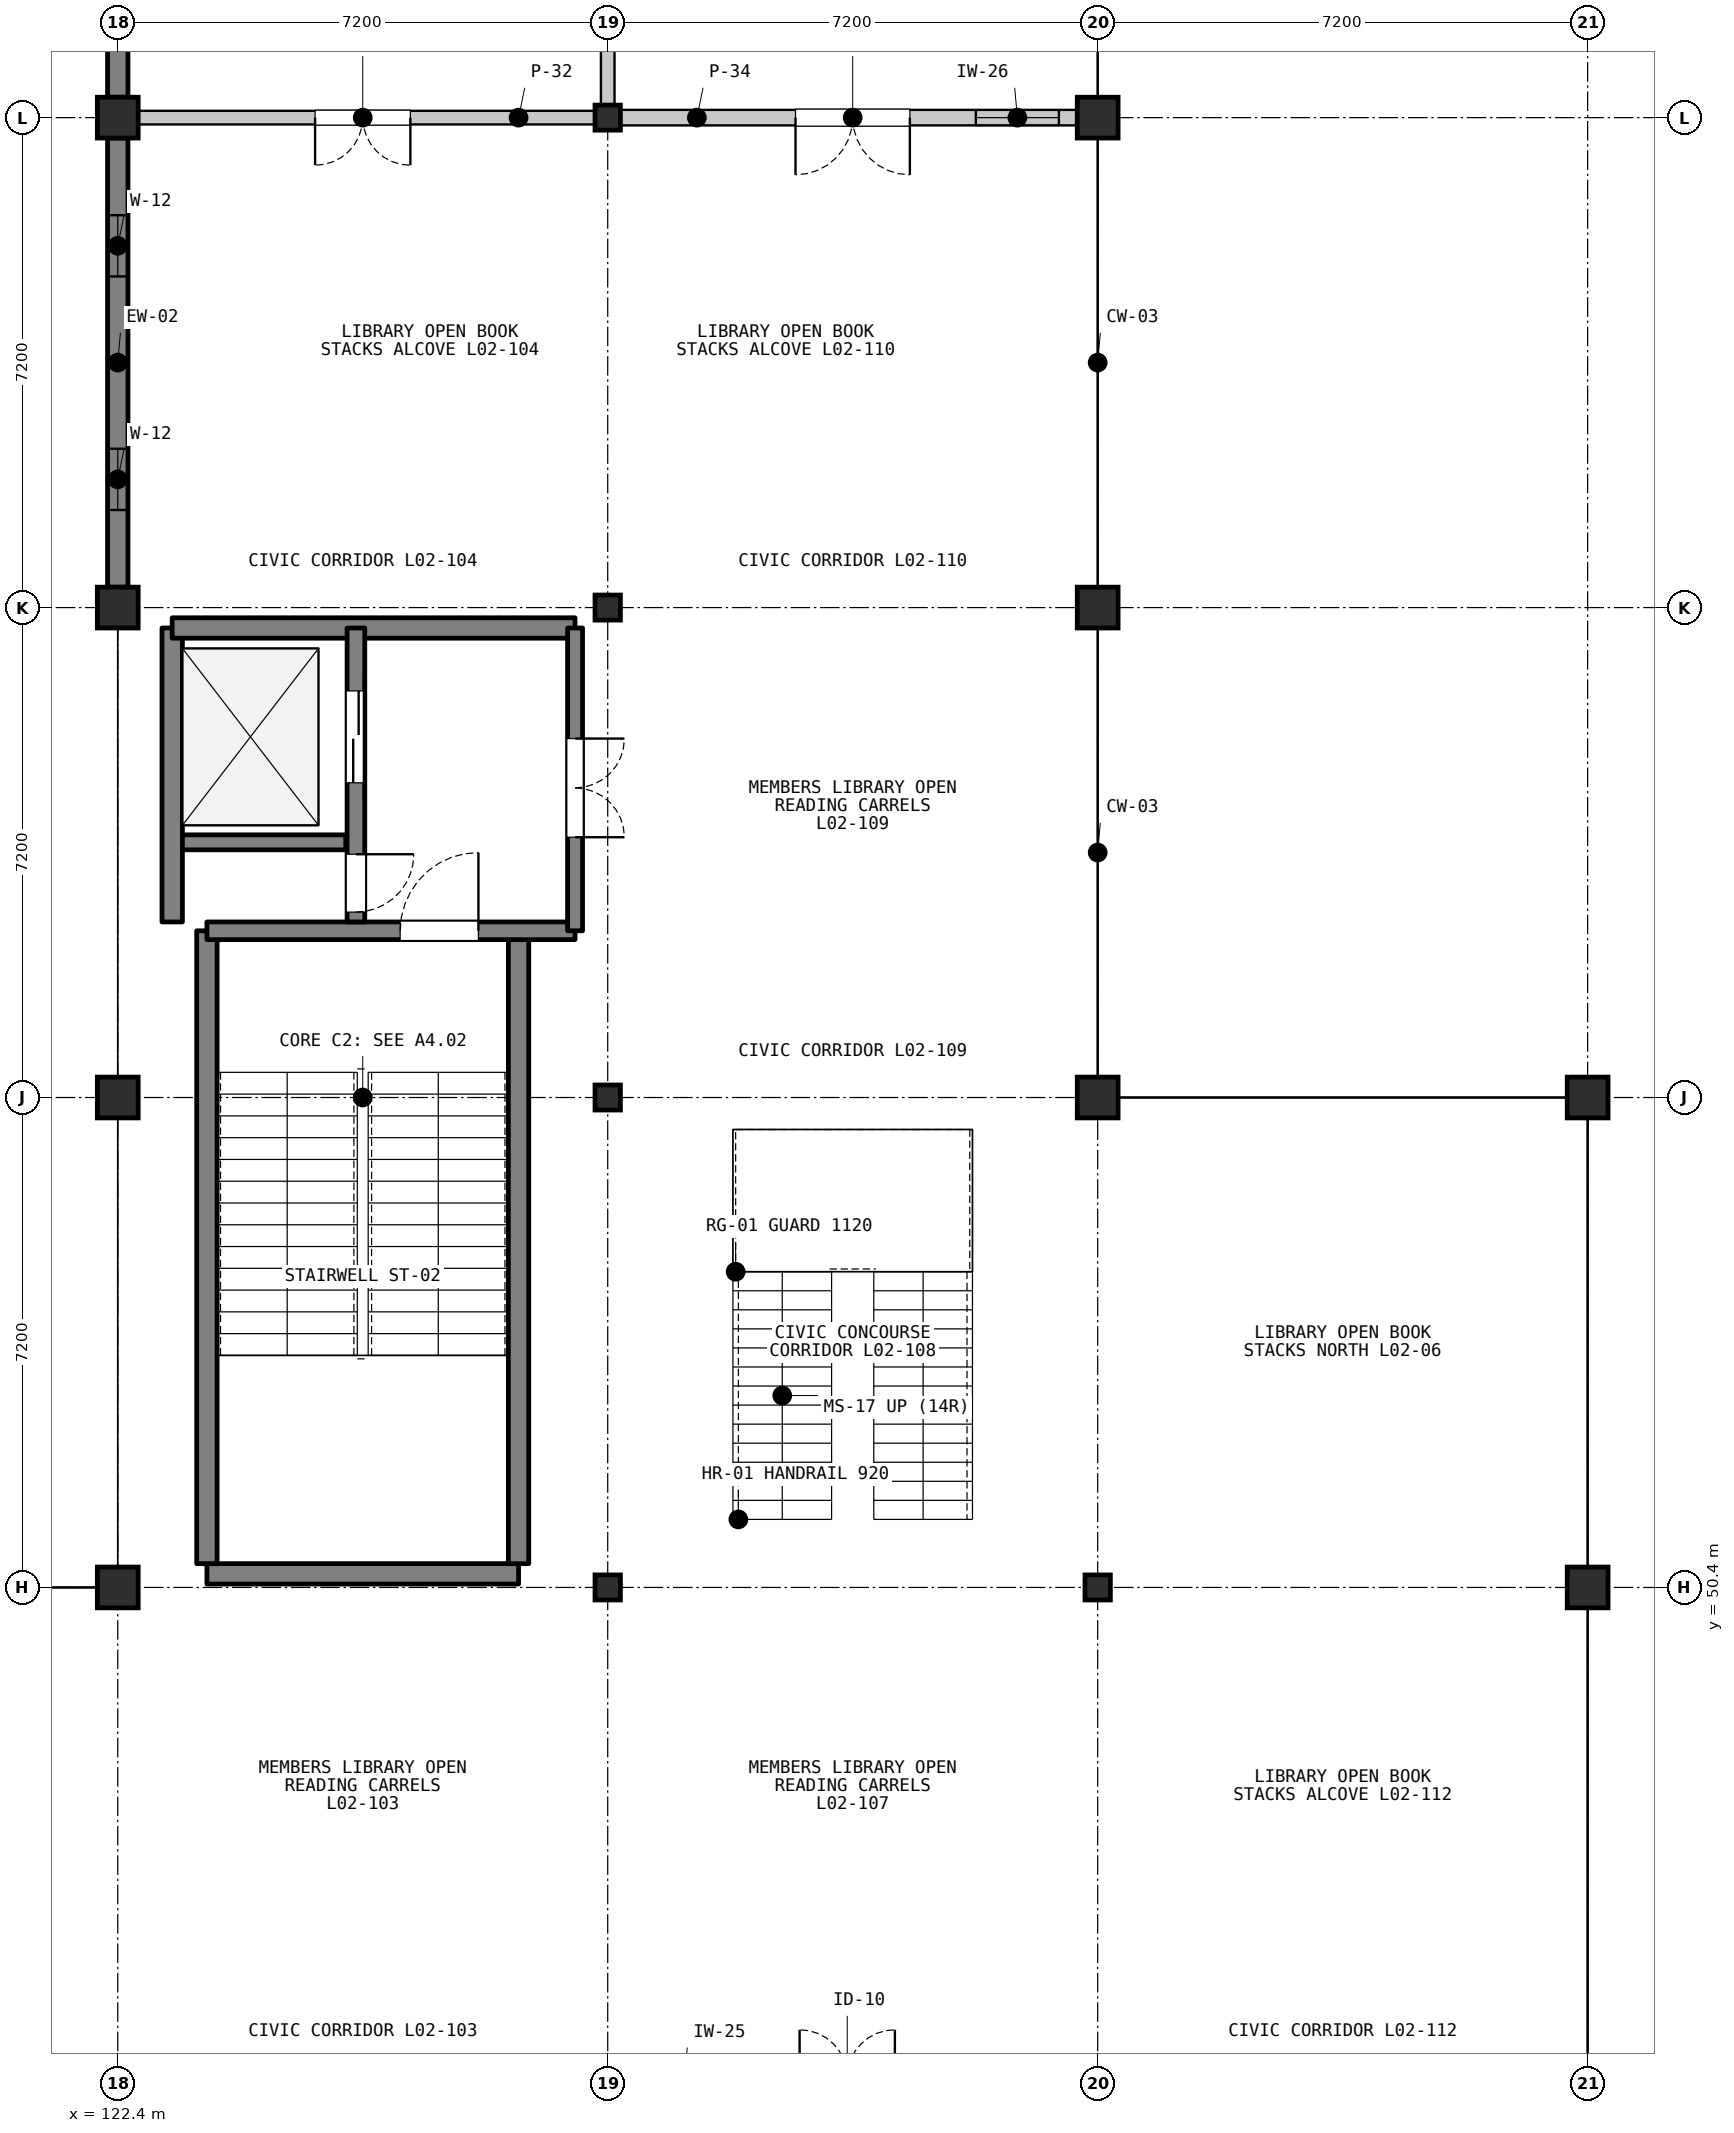
"""IFC4 building model, lengths in metres.
Left out: names, types, materials, properties, quantities, classifications, styles, units other than length and angle.
Written with IfcOpenShell. Run it as: python <this file> out.ifc"""

import sys

from ifc_helpers import new_model, si_unit, direction, frame, frame_2d, origin, origin_2d, place, context, subcontext, project, spatial, rectangle, i_section, extrude, element, fill, save


model = new_model("IFC4")
c1 = context("Model", 3, precision=1e-05, world=origin(), true_north=direction((0.0, 1.0)))
c2 = subcontext(c1, "Body", "Model", "MODEL_VIEW")
j1 = project(units=[si_unit("LENGTHUNIT", "METRE"), si_unit("PLANEANGLEUNIT", "RADIAN")], contexts=[c1])
p1 = place(None, origin())
s1 = spatial("IfcSite", under=j1, at=p1, CompositionType="ELEMENT")
p2 = place(p1, origin())
s2 = spatial("IfcBuilding", under=s1, at=p2, CompositionType="ELEMENT")
p3 = place(p2, frame((0.0, 0.0, 5.4)))
s3 = spatial("IfcBuildingStorey", under=s2, at=p3, CompositionType="ELEMENT", Elevation=5.4)
for number, where, z_axis, x_axis in (
    (1, (122.4, 50.4, 0.0), (0.0, 0.0, 1.0), (1.0, 0.0, 0.0)),
    (2, (122.4, 57.6, 0.0), (0.0, 0.0, 1.0), (1.0, 0.0, 0.0)),
    (3, (122.4, 64.8, 0.0), (0.0, 0.0, 1.0), (1.0, 0.0, 0.0)),
    (4, (122.4, 72.0, 0.0), (0.0, 0.0, 1.0), (1.0, 0.0, 0.0)),
):
    element("IfcColumn", number, at=place(p3, frame(where, z_axis=z_axis, x_axis=x_axis)), inside=s3, PredefinedType="COLUMN", context=c2, shape_type="SweptSolid", body=[
        extrude(rectangle(XDim=0.6, YDim=0.6, at=origin_2d()), origin(), (0.0, 0.0, 1.0), 4.5),
    ])
for number, where, z_axis, x_axis in (
    (5, (129.6, 50.4, 0.0), (0.0, 0.0, 1.0), (1.0, 0.0, 0.0)),
    (6, (129.6, 57.6, 0.0), (0.0, 0.0, 1.0), (1.0, 0.0, 0.0)),
    (7, (129.6, 64.8, 0.0), (0.0, 0.0, 1.0), (1.0, 0.0, 0.0)),
    (8, (129.6, 72.0, 0.0), (0.0, 0.0, 1.0), (1.0, 0.0, 0.0)),
    (9, (136.8, 50.4, 0.0), (0.0, 0.0, 1.0), (1.0, 0.0, 0.0)),
):
    element("IfcColumn", number, at=place(p3, frame(where, z_axis=z_axis, x_axis=x_axis)), inside=s3, PredefinedType="COLUMN", context=c2, shape_type="SweptSolid", body=[
        extrude(i_section(OverallWidth=0.373, OverallDepth=0.368, WebThickness=0.015, FlangeThickness=0.024, FilletRadius=0.015, at=origin_2d()), origin(), (0.0, 0.0, 1.0), 4.5),
    ])
for number, where, z_axis, x_axis in (
    (10, (136.8, 57.6, 0.0), (0.0, 0.0, 1.0), (1.0, 0.0, 0.0)),
    (11, (136.8, 64.8, 0.0), (0.0, 0.0, 1.0), (1.0, 0.0, 0.0)),
    (12, (136.8, 72.0, 0.0), (0.0, 0.0, 1.0), (1.0, 0.0, 0.0)),
    (13, (144.0, 50.4, 0.0), (0.0, 0.0, 1.0), (1.0, 0.0, 0.0)),
    (14, (144.0, 57.6, 0.0), (0.0, 0.0, 1.0), (1.0, 0.0, 0.0)),
):
    element("IfcColumn", number, at=place(p3, frame(where, z_axis=z_axis, x_axis=x_axis)), inside=s3, PredefinedType="COLUMN", context=c2, shape_type="SweptSolid", body=[
        extrude(rectangle(XDim=0.6, YDim=0.6, at=origin_2d()), origin(), (0.0, 0.0, 1.0), 4.5),
    ])
p4 = place(p3, frame((122.4, 65.1, 0.0), z_axis=(0.0, 0.0, 1.0), x_axis=(0.0, 1.0, 0.0)))
e15 = element("IfcWall", 15, at=p4, inside=s3, PredefinedType="SOLIDWALL", context=c2, shape_type="SweptSolid", body=[
    extrude(rectangle(XDim=6.6, YDim=0.3, at=frame_2d((3.3, 0.0))), origin(), (0.0, 0.0, 1.0), 3.767),
])
p5 = place(p4, frame((1.134, 0.0, 0.95)))
e16 = element("IfcOpeningElement", 16, at=p5, cuts=e15, PredefinedType="OPENING", context=c2, shape_type="SweptSolid", body=[
    extrude(rectangle(XDim=0.9, YDim=2.1, at=frame_2d((0.45, 1.05))), frame((0.0, 0.16, 0.0), z_axis=(0.0, -1.0, 0.0), x_axis=(1.0, 0.0, 0.0)), (0.0, 0.0, 1.0), 0.32),
])
p6 = place(p4, frame((4.566, 0.0, 0.95)))
e17 = element("IfcOpeningElement", 17, at=p6, cuts=e15, PredefinedType="OPENING", context=c2, shape_type="SweptSolid", body=[
    extrude(rectangle(XDim=0.9, YDim=2.1, at=frame_2d((0.45, 1.05))), frame((0.0, 0.16, 0.0), z_axis=(0.0, -1.0, 0.0), x_axis=(1.0, 0.0, 0.0)), (0.0, 0.0, 1.0), 0.32),
])
p7 = place(p3, frame((122.4, 72.3, 0.0), z_axis=(0.0, 0.0, 1.0), x_axis=(0.0, 1.0, 0.0)))
e18 = element("IfcWall", 18, at=p7, inside=s3, PredefinedType="SOLIDWALL", context=c2, shape_type="SweptSolid", body=[
    extrude(rectangle(XDim=6.6, YDim=0.3, at=frame_2d((3.3, 0.0))), origin(), (0.0, 0.0, 1.0), 3.767),
])
p8 = place(p7, frame((2.225, 0.0, 0.95)))
e19 = element("IfcOpeningElement", 19, at=p8, cuts=e18, PredefinedType="OPENING", context=c2, shape_type="SweptSolid", body=[
    extrude(rectangle(XDim=2.15, YDim=2.05, at=frame_2d((1.075, 1.025))), frame((0.0, 0.16, 0.0), z_axis=(0.0, -1.0, 0.0), x_axis=(1.0, 0.0, 0.0)), (0.0, 0.0, 1.0), 0.32),
])
p9 = place(p3, frame((123.71, 50.6, 0.0), z_axis=(0.0, 0.0, 1.0), x_axis=(1.0, 0.0, 0.0)))
e20 = element("IfcWall", 20, at=p9, inside=s3, PredefinedType="SHEAR", context=c2, shape_type="SweptSolid", body=[
    extrude(rectangle(XDim=4.58, YDim=0.3, at=frame_2d((2.29, 0.0))), origin(), (0.0, 0.0, 1.0), 4.3),
])
for number, where, z_axis, x_axis in (
    (21, (123.71, 50.75, 0.0), (0.0, 0.0, 1.0), (0.0, 1.0, 0.0)),
    (22, (128.29, 50.75, 0.0), (0.0, 0.0, 1.0), (0.0, 1.0, 0.0)),
):
    element("IfcWall", number, at=place(p3, frame(where, z_axis=z_axis, x_axis=x_axis)), inside=s3, PredefinedType="SHEAR", context=c2, shape_type="SweptSolid", body=[
        extrude(rectangle(XDim=9.3, YDim=0.3, at=frame_2d((4.65, 0.0))), origin(), (0.0, 0.0, 1.0), 4.3),
    ])
p10 = place(p3, frame((123.71, 60.05, 0.0), z_axis=(0.0, 0.0, 1.0), x_axis=(1.0, 0.0, 0.0)))
e23 = element("IfcWall", 23, at=p10, inside=s3, PredefinedType="SHEAR", context=c2, shape_type="SweptSolid", body=[
    extrude(rectangle(XDim=5.41, YDim=0.26, at=frame_2d((2.705, 0.0))), origin(), (0.0, 0.0, 1.0), 4.3),
])
p11 = place(p10, frame((2.84, 0.0, 0.0)))
e24 = element("IfcOpeningElement", 24, at=p11, cuts=e23, PredefinedType="OPENING", context=c2, shape_type="SweptSolid", body=[
    extrude(rectangle(XDim=1.15, YDim=2.15, at=frame_2d((0.575, 1.075))), frame((0.0, 0.14, 0.0), z_axis=(0.0, -1.0, 0.0), x_axis=(1.0, 0.0, 0.0)), (0.0, 0.0, 1.0), 0.28),
])
p12 = place(p3, frame((123.2, 60.18, 0.0), z_axis=(0.0, 0.0, 1.0), x_axis=(0.0, 1.0, 0.0)))
e25 = element("IfcWall", 25, at=p12, inside=s3, PredefinedType="SHEAR", context=c2, shape_type="SweptSolid", body=[
    extrude(rectangle(XDim=4.32, YDim=0.3, at=frame_2d((2.16, 0.0))), origin(), (0.0, 0.0, 1.0), 4.3),
])
p13 = place(p3, frame((123.2, 64.5, 0.0), z_axis=(0.0, 0.0, 1.0), x_axis=(1.0, 0.0, 0.0)))
e26 = element("IfcWall", 26, at=p13, inside=s3, PredefinedType="SHEAR", context=c2, shape_type="SweptSolid", body=[
    extrude(rectangle(XDim=5.92, YDim=0.3, at=frame_2d((2.96, 0.0))), origin(), (0.0, 0.0, 1.0), 4.3),
])
p14 = place(p3, frame((123.35, 61.35, 0.0), z_axis=(0.0, 0.0, 1.0), x_axis=(1.0, 0.0, 0.0)))
e27 = element("IfcWall", 27, at=p14, inside=s3, PredefinedType="SHEAR", context=c2, shape_type="SweptSolid", body=[
    extrude(rectangle(XDim=2.4, YDim=0.22, at=frame_2d((1.2, 0.0))), origin(), (0.0, 0.0, 1.0), 4.3),
])
p15 = place(p3, frame((125.9, 64.5, 0.0), z_axis=(0.0, 0.0, 1.0), x_axis=(0.0, -1.0, 0.0)))
e28 = element("IfcWall", 28, at=p15, inside=s3, PredefinedType="SHEAR", context=c2, shape_type="SweptSolid", body=[
    extrude(rectangle(XDim=4.32, YDim=0.26, at=frame_2d((2.16, 0.0))), origin(), (0.0, 0.0, 1.0), 4.3),
])
p16 = place(p15, frame((0.925, 0.0, 0.0)))
e29 = element("IfcOpeningElement", 29, at=p16, cuts=e28, PredefinedType="OPENING", context=c2, shape_type="SweptSolid", body=[
    extrude(rectangle(XDim=1.35, YDim=2.2, at=frame_2d((0.675, 1.1))), frame((0.0, 0.14, 0.0), z_axis=(0.0, -1.0, 0.0), x_axis=(1.0, 0.0, 0.0)), (0.0, 0.0, 1.0), 0.28),
])
p17 = place(p15, frame((3.325, 0.0, 0.0)))
e30 = element("IfcOpeningElement", 30, at=p17, cuts=e28, PredefinedType="OPENING", context=c2, shape_type="SweptSolid", body=[
    extrude(rectangle(XDim=0.85, YDim=2.05, at=frame_2d((0.425, 1.025))), frame((0.0, 0.14, 0.0), z_axis=(0.0, -1.0, 0.0), x_axis=(1.0, 0.0, 0.0)), (0.0, 0.0, 1.0), 0.28),
])
p18 = place(p3, frame((129.12, 64.5, 0.0), z_axis=(0.0, 0.0, 1.0), x_axis=(0.0, -1.0, 0.0)))
e31 = element("IfcWall", 31, at=p18, inside=s3, PredefinedType="SHEAR", context=c2, shape_type="SweptSolid", body=[
    extrude(rectangle(XDim=4.45, YDim=0.22, at=frame_2d((2.225, 0.0))), origin(), (0.0, 0.0, 1.0), 4.3),
])
p19 = place(p18, frame((1.625, 0.0, 0.0)))
e32 = element("IfcOpeningElement", 32, at=p19, cuts=e31, PredefinedType="OPENING", context=c2, shape_type="SweptSolid", body=[
    extrude(rectangle(XDim=1.45, YDim=2.2, at=frame_2d((0.725, 1.1))), frame((0.0, 0.12, 0.0), z_axis=(0.0, -1.0, 0.0), x_axis=(1.0, 0.0, 0.0)), (0.0, 0.0, 1.0), 0.24),
])
p20 = place(p3, frame((129.48, 72.0, 0.0), z_axis=(0.0, 0.0, 1.0), x_axis=(-1.0, 0.0, 0.0)))
e33 = element("IfcWall", 33, at=p20, inside=s3, PredefinedType="PARTITIONING", context=c2, shape_type="SweptSolid", body=[
    extrude(rectangle(XDim=6.96, YDim=0.2, at=frame_2d((3.48, 0.0))), origin(), (0.0, 0.0, 1.0), 3.678),
])
p21 = place(p20, frame((2.78, 0.0, 0.0)))
e34 = element("IfcOpeningElement", 34, at=p21, cuts=e33, PredefinedType="OPENING", context=c2, shape_type="SweptSolid", body=[
    extrude(rectangle(XDim=1.4, YDim=2.25, at=frame_2d((0.7, 1.125))), frame((0.0, 0.11, 0.0), z_axis=(0.0, -1.0, 0.0), x_axis=(1.0, 0.0, 0.0)), (0.0, 0.0, 1.0), 0.22),
])
p22 = place(p3, frame((129.6, 79.08, 0.0), z_axis=(0.0, 0.0, 1.0), x_axis=(0.0, -1.0, 0.0)))
e35 = element("IfcWall", 35, at=p22, inside=s3, PredefinedType="PARTITIONING", context=c2, shape_type="SweptSolid", body=[
    extrude(rectangle(XDim=6.96, YDim=0.2, at=frame_2d((3.48, 0.0))), origin(), (0.0, 0.0, 1.0), 3.678),
])
p23 = place(p3, frame((136.68, 72.0, 0.0), z_axis=(0.0, 0.0, 1.0), x_axis=(-1.0, 0.0, 0.0)))
e36 = element("IfcWall", 36, at=p23, inside=s3, PredefinedType="PARTITIONING", context=c2, shape_type="SweptSolid", body=[
    extrude(rectangle(XDim=6.96, YDim=0.228, at=frame_2d((3.48, 0.0))), origin(), (0.0, 0.0, 1.0), 3.678),
])
p24 = place(p23, frame((2.64, 0.0, 0.0)))
e37 = element("IfcOpeningElement", 37, at=p24, cuts=e36, PredefinedType="OPENING", context=c2, shape_type="SweptSolid", body=[
    extrude(rectangle(XDim=1.68, YDim=2.35, at=frame_2d((0.84, 1.175))), frame((0.0, 0.124, 0.0), z_axis=(0.0, -1.0, 0.0), x_axis=(1.0, 0.0, 0.0)), (0.0, 0.0, 1.0), 0.248),
])
p25 = place(p23, frame((0.45, 0.0, 1.05)))
e38 = element("IfcOpeningElement", 38, at=p25, cuts=e36, PredefinedType="OPENING", context=c2, shape_type="SweptSolid", body=[
    extrude(rectangle(XDim=1.22, YDim=0.92, at=frame_2d((0.61, 0.46))), frame((0.0, 0.124, 0.0), z_axis=(0.0, -1.0, 0.0), x_axis=(1.0, 0.0, 0.0)), (0.0, 0.0, 1.0), 0.248),
])
p26 = place(p5, origin())
e39 = element("IfcWindow", 39, at=p26, inside=s3, PartitioningType="SINGLE_PANEL", PredefinedType="WINDOW", context=c2, shape_type="SweptSolid", body=[
    extrude(rectangle(XDim=0.9, YDim=2.1, at=frame_2d((0.45, 1.05))), frame((0.0, 0.03, 0.0), z_axis=(0.0, -1.0, 0.0), x_axis=(1.0, 0.0, 0.0)), (0.0, 0.0, 1.0), 0.06),
])
fill(e16, e39)
p27 = place(p6, origin())
e40 = element("IfcWindow", 40, at=p27, inside=s3, PartitioningType="SINGLE_PANEL", PredefinedType="WINDOW", context=c2, shape_type="SweptSolid", body=[
    extrude(rectangle(XDim=0.9, YDim=2.1, at=frame_2d((0.45, 1.05))), frame((0.0, 0.03, 0.0), z_axis=(0.0, -1.0, 0.0), x_axis=(1.0, 0.0, 0.0)), (0.0, 0.0, 1.0), 0.06),
])
fill(e17, e40)
p28 = place(p11, origin())
e41 = element("IfcDoor", 41, at=p28, inside=s3, OperationType="SINGLE_SWING_RIGHT", PredefinedType="DOOR", context=c2, shape_type="SweptSolid", body=[
    extrude(rectangle(XDim=1.15, YDim=2.15, at=frame_2d((0.575, 1.075))), frame((0.0, 0.025, 0.0), z_axis=(0.0, -1.0, 0.0), x_axis=(1.0, 0.0, 0.0)), (0.0, 0.0, 1.0), 0.05),
])
fill(e24, e41)
p29 = place(p16, origin())
e42 = element("IfcDoor", 42, at=p29, inside=s3, OperationType="DOUBLE_DOOR_SLIDING", PredefinedType="DOOR", context=c2, shape_type="SweptSolid", body=[
    extrude(rectangle(XDim=1.35, YDim=2.2, at=frame_2d((0.675, 1.1))), frame((0.0, 0.025, 0.0), z_axis=(0.0, -1.0, 0.0), x_axis=(1.0, 0.0, 0.0)), (0.0, 0.0, 1.0), 0.05),
])
fill(e29, e42)
p30 = place(p17, origin())
e43 = element("IfcDoor", 43, at=p30, inside=s3, OperationType="SINGLE_SWING_LEFT", PredefinedType="DOOR", context=c2, shape_type="SweptSolid", body=[
    extrude(rectangle(XDim=0.85, YDim=2.05, at=frame_2d((0.425, 1.025))), frame((0.0, 0.025, 0.0), z_axis=(0.0, -1.0, 0.0), x_axis=(1.0, 0.0, 0.0)), (0.0, 0.0, 1.0), 0.05),
])
fill(e30, e43)
p31 = place(p19, origin())
e44 = element("IfcDoor", 44, at=p31, inside=s3, OperationType="DOUBLE_DOOR_SINGLE_SWING", PredefinedType="DOOR", context=c2, shape_type="SweptSolid", body=[
    extrude(rectangle(XDim=1.45, YDim=2.2, at=frame_2d((0.725, 1.1))), frame((0.0, 0.025, 0.0), z_axis=(0.0, -1.0, 0.0), x_axis=(1.0, 0.0, 0.0)), (0.0, 0.0, 1.0), 0.05),
])
fill(e32, e44)
p32 = place(p21, origin())
e45 = element("IfcDoor", 45, at=p32, inside=s3, OperationType="DOUBLE_DOOR_SINGLE_SWING", PredefinedType="DOOR", context=c2, shape_type="SweptSolid", body=[
    extrude(rectangle(XDim=1.4, YDim=2.25, at=frame_2d((0.7, 1.125))), frame((0.0, 0.025, 0.0), z_axis=(0.0, -1.0, 0.0), x_axis=(1.0, 0.0, 0.0)), (0.0, 0.0, 1.0), 0.05),
])
fill(e34, e45)
p33 = place(p24, origin())
e46 = element("IfcDoor", 46, at=p33, inside=s3, OperationType="DOUBLE_DOOR_SINGLE_SWING", PredefinedType="DOOR", context=c2, shape_type="SweptSolid", body=[
    extrude(rectangle(XDim=1.68, YDim=2.35, at=frame_2d((0.84, 1.175))), frame((0.0, 0.025, 0.0), z_axis=(0.0, -1.0, 0.0), x_axis=(1.0, 0.0, 0.0)), (0.0, 0.0, 1.0), 0.05),
])
fill(e37, e46)
p34 = place(p25, origin())
e47 = element("IfcWindow", 47, at=p34, inside=s3, PartitioningType="SINGLE_PANEL", PredefinedType="WINDOW", context=c2, shape_type="SweptSolid", body=[
    extrude(rectangle(XDim=1.22, YDim=0.92, at=frame_2d((0.61, 0.46))), frame((0.0, 0.03, 0.0), z_axis=(0.0, -1.0, 0.0), x_axis=(1.0, 0.0, 0.0)), (0.0, 0.0, 1.0), 0.06),
])
fill(e38, e47)
save(model, sys.argv[1])
